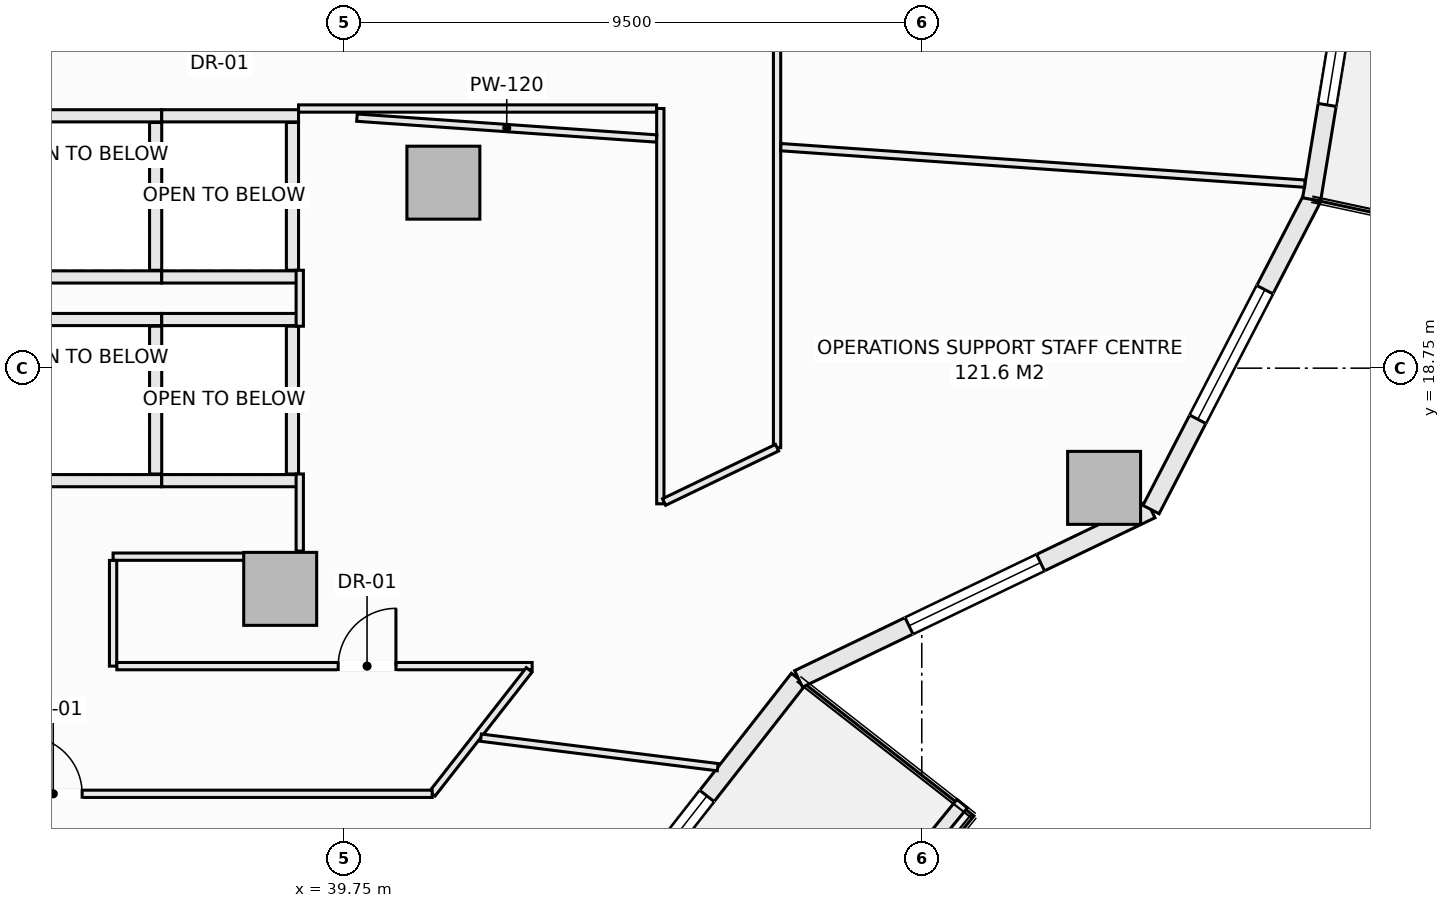
"""IFC4 building model, lengths in metres.
Left out: names, types, materials, properties, quantities, classifications, styles, units other than length and angle.
Written with IfcOpenShell. Run it as: python <this file> out.ifc"""

import sys

from ifc_helpers import new_model, si_unit, direction, frame, frame_2d, origin, origin_2d, place, context, subcontext, project, spatial, rectangle, extrude, element, fill, save


model = new_model("IFC4")
c1 = context("Model", 3, precision=1e-05, world=origin(), true_north=direction((0.0, 1.0)))
c2 = subcontext(c1, "Body", "Model", "MODEL_VIEW")
j1 = project(units=[si_unit("LENGTHUNIT", "METRE"), si_unit("PLANEANGLEUNIT", "RADIAN")], contexts=[c1])
p1 = place(None, origin())
s1 = spatial("IfcSite", under=j1, at=p1, CompositionType="ELEMENT")
p2 = place(p1, origin())
s2 = spatial("IfcBuilding", under=s1, at=p2, CompositionType="ELEMENT")
p3 = place(p2, frame((0.0, 0.0, 80.4)))
s3 = spatial("IfcBuildingStorey", under=s2, at=p3, CompositionType="ELEMENT", Elevation=80.4)
for number, where, z_axis, x_axis in (
    (1, (52.249, 16.781, -0.28), (0.0, 0.0, 1.0), (1.0, 0.0, 0.0)),
    (2, (38.698, 15.121, -0.28), (0.0, 0.0, 1.0), (1.0, 0.0, 0.0)),
    (3, (41.382, 21.801, -0.28), (0.0, 0.0, 1.0), (1.0, 0.0, 0.0)),
):
    element("IfcColumn", number, at=place(p3, frame(where, z_axis=z_axis, x_axis=x_axis)), inside=s3, PredefinedType="COLUMN", context=c2, shape_type="SweptSolid", body=[
        extrude(rectangle(XDim=1.2, YDim=1.2, at=origin_2d()), origin(), (0.0, 0.0, 1.0), 3.85),
    ])
p4 = place(p3, frame((43.344, 8.684, 0.0), z_axis=(0.0, 0.0, 1.0), x_axis=(0.616434798832, 0.78740595552, 0.0)))
e4 = element("IfcWall", 4, at=p4, inside=s3, PredefinedType="SOLIDWALL", context=c2, shape_type="SweptSolid", body=[
    extrude(rectangle(XDim=6.294, YDim=0.3, at=frame_2d((3.147, 0.0))), origin(), (0.0, 0.0, 1.0), 3.093),
])
p5 = place(p4, frame((1.45, 0.0, 0.85)))
e5 = element("IfcOpeningElement", 5, at=p5, cuts=e4, PredefinedType="OPENING", context=c2, shape_type="SweptSolid", body=[
    extrude(rectangle(XDim=2.4, YDim=1.9, at=frame_2d((1.2, 0.95))), frame((0.0, 0.16, 0.0), z_axis=(0.0, -1.0, 0.0), x_axis=(1.0, 0.0, 0.0)), (0.0, 0.0, 1.0), 0.32),
])
p6 = place(p3, frame((47.224, 13.64, 0.0), z_axis=(0.0, 0.0, 1.0), x_axis=(0.901354747727, 0.433081538224, 0.0)))
e6 = element("IfcWall", 6, at=p6, inside=s3, PredefinedType="SOLIDWALL", context=c2, shape_type="SweptSolid", body=[
    extrude(rectangle(XDim=6.431, YDim=0.3, at=frame_2d((3.215, 0.0))), origin(), (0.0, 0.0, 1.0), 3.093),
])
p7 = place(p6, frame((2.015, 0.0, 0.85)))
e7 = element("IfcOpeningElement", 7, at=p7, cuts=e6, PredefinedType="OPENING", context=c2, shape_type="SweptSolid", body=[
    extrude(rectangle(XDim=2.4, YDim=1.9, at=frame_2d((1.2, 0.95))), frame((0.0, 0.16, 0.0), z_axis=(0.0, -1.0, 0.0), x_axis=(1.0, 0.0, 0.0)), (0.0, 0.0, 1.0), 0.32),
])
p8 = place(p3, frame((53.021, 16.425, 0.0), z_axis=(0.0, 0.0, 1.0), x_axis=(0.459800981414, 0.888021991558, 0.0)))
e8 = element("IfcWall", 8, at=p8, inside=s3, PredefinedType="SOLIDWALL", context=c2, shape_type="SweptSolid", body=[
    extrude(rectangle(XDim=5.744, YDim=0.3, at=frame_2d((2.872, 0.0))), origin(), (0.0, 0.0, 1.0), 3.093),
])
p9 = place(p8, frame((1.672, 0.0, 0.85)))
e9 = element("IfcOpeningElement", 9, at=p9, cuts=e8, PredefinedType="OPENING", context=c2, shape_type="SweptSolid", body=[
    extrude(rectangle(XDim=2.4, YDim=1.9, at=frame_2d((1.2, 0.95))), frame((0.0, 0.16, 0.0), z_axis=(0.0, -1.0, 0.0), x_axis=(1.0, 0.0, 0.0)), (0.0, 0.0, 1.0), 0.32),
])
p10 = place(p3, frame((55.662, 21.526, 0.0), z_axis=(0.0, 0.0, 1.0), x_axis=(0.162386212206, 0.986727276447, 0.0)))
e10 = element("IfcWall", 10, at=p10, inside=s3, PredefinedType="SOLIDWALL", context=c2, shape_type="SweptSolid", body=[
    extrude(rectangle(XDim=5.548, YDim=0.3, at=frame_2d((2.774, 0.0))), origin(), (0.0, 0.0, 1.0), 3.093),
])
p11 = place(p10, frame((1.574, 0.0, 0.85)))
e11 = element("IfcOpeningElement", 11, at=p11, cuts=e10, PredefinedType="OPENING", context=c2, shape_type="SweptSolid", body=[
    extrude(rectangle(XDim=2.4, YDim=1.9, at=frame_2d((1.2, 0.95))), frame((0.0, 0.16, 0.0), z_axis=(0.0, -1.0, 0.0), x_axis=(1.0, 0.0, 0.0)), (0.0, 0.0, 1.0), 0.32),
])
p12 = place(p3, frame((45.292, 5.918, 0.0), z_axis=(0.0, 0.0, 1.0), x_axis=(0.631819273026, 0.775115737315, 0.0)))
e12 = element("IfcWall", 12, at=p12, inside=s3, PredefinedType="PARAPET", context=c2, shape_type="SweptSolid", body=[
    extrude(rectangle(XDim=7.316, YDim=0.22, at=frame_2d((3.658, 0.0))), origin(), (0.0, 0.0, 1.0), 0.52),
])
for number, where, z_axis, x_axis in (
    (13, (34.5, 19.55, 0.0), (0.0, 0.0, 1.0), (1.0, 0.0, 0.0)),
    (14, (34.5, 16.9, 0.0), (0.0, 0.0, 1.0), (1.0, 0.0, 0.0)),
):
    element("IfcWall", number, at=place(p3, frame(where, z_axis=z_axis, x_axis=x_axis)), inside=s3, PredefinedType="SOLIDWALL", context=c2, shape_type="SweptSolid", body=[
        extrude(rectangle(XDim=2.25, YDim=0.2, at=frame_2d((1.125, 0.0))), origin(), (0.0, 0.0, 1.0), 3.57),
    ])
p13 = place(p3, frame((36.65, 17.01, 0.0), z_axis=(0.0, 0.0, 1.0), x_axis=(0.0, 1.0, 0.0)))
e15 = element("IfcWall", 15, at=p13, inside=s3, PredefinedType="SOLIDWALL", context=c2, shape_type="SweptSolid", body=[
    extrude(rectangle(XDim=2.43, YDim=0.2, at=frame_2d((1.215, 0.0))), origin(), (0.0, 0.0, 1.0), 3.57),
])
for number, where, z_axis, x_axis in (
    (16, (36.75, 19.55, 0.0), (0.0, 0.0, 1.0), (1.0, 0.0, 0.0)),
    (17, (36.75, 16.9, 0.0), (0.0, 0.0, 1.0), (1.0, 0.0, 0.0)),
):
    element("IfcWall", number, at=place(p3, frame(where, z_axis=z_axis, x_axis=x_axis)), inside=s3, PredefinedType="SOLIDWALL", context=c2, shape_type="SweptSolid", body=[
        extrude(rectangle(XDim=2.25, YDim=0.2, at=frame_2d((1.125, 0.0))), origin(), (0.0, 0.0, 1.0), 3.57),
    ])
p14 = place(p3, frame((38.9, 17.01, 0.0), z_axis=(0.0, 0.0, 1.0), x_axis=(0.0, 1.0, 0.0)))
e18 = element("IfcWall", 18, at=p14, inside=s3, PredefinedType="SOLIDWALL", context=c2, shape_type="SweptSolid", body=[
    extrude(rectangle(XDim=2.43, YDim=0.2, at=frame_2d((1.215, 0.0))), origin(), (0.0, 0.0, 1.0), 3.57),
])
for number, where, z_axis, x_axis in (
    (19, (34.5, 22.9, 0.0), (0.0, 0.0, 1.0), (1.0, 0.0, 0.0)),
    (20, (34.5, 20.25, 0.0), (0.0, 0.0, 1.0), (1.0, 0.0, 0.0)),
):
    element("IfcWall", number, at=place(p3, frame(where, z_axis=z_axis, x_axis=x_axis)), inside=s3, PredefinedType="SOLIDWALL", context=c2, shape_type="SweptSolid", body=[
        extrude(rectangle(XDim=2.25, YDim=0.2, at=frame_2d((1.125, 0.0))), origin(), (0.0, 0.0, 1.0), 3.57),
    ])
p15 = place(p3, frame((36.65, 20.36, 0.0), z_axis=(0.0, 0.0, 1.0), x_axis=(0.0, 1.0, 0.0)))
e21 = element("IfcWall", 21, at=p15, inside=s3, PredefinedType="SOLIDWALL", context=c2, shape_type="SweptSolid", body=[
    extrude(rectangle(XDim=2.43, YDim=0.2, at=frame_2d((1.215, 0.0))), origin(), (0.0, 0.0, 1.0), 3.57),
])
for number, where, z_axis, x_axis in (
    (22, (36.75, 22.9, 0.0), (0.0, 0.0, 1.0), (1.0, 0.0, 0.0)),
    (23, (36.75, 20.25, 0.0), (0.0, 0.0, 1.0), (1.0, 0.0, 0.0)),
):
    element("IfcWall", number, at=place(p3, frame(where, z_axis=z_axis, x_axis=x_axis)), inside=s3, PredefinedType="SOLIDWALL", context=c2, shape_type="SweptSolid", body=[
        extrude(rectangle(XDim=2.25, YDim=0.2, at=frame_2d((1.125, 0.0))), origin(), (0.0, 0.0, 1.0), 3.57),
    ])
p16 = place(p3, frame((38.9, 20.36, 0.0), z_axis=(0.0, 0.0, 1.0), x_axis=(0.0, 1.0, 0.0)))
e24 = element("IfcWall", 24, at=p16, inside=s3, PredefinedType="SOLIDWALL", context=c2, shape_type="SweptSolid", body=[
    extrude(rectangle(XDim=2.43, YDim=0.2, at=frame_2d((1.215, 0.0))), origin(), (0.0, 0.0, 1.0), 3.57),
])
p17 = place(p3, frame((35.95, 15.65, 0.0), z_axis=(0.0, 0.0, 1.0), x_axis=(1.0, 0.0, 0.0)))
e25 = element("IfcWall", 25, at=p17, inside=s3, PredefinedType="PARTITIONING", context=c2, shape_type="SweptSolid", body=[
    extrude(rectangle(XDim=2.291, YDim=0.12, at=frame_2d((1.146, 0.0))), origin(), (0.0, 0.0, 1.0), 3.57),
])
p18 = place(p3, frame((35.95, 13.85, 0.0), z_axis=(0.0, 0.0, 1.0), x_axis=(0.0, 1.0, 0.0)))
e26 = element("IfcWall", 26, at=p18, inside=s3, PredefinedType="PARTITIONING", context=c2, shape_type="SweptSolid", body=[
    extrude(rectangle(XDim=1.738, YDim=0.12, at=frame_2d((0.869, 0.0))), origin(), (0.0, 0.0, 1.0), 3.57),
])
p19 = place(p3, frame((36.012, 13.85, 0.0), z_axis=(0.0, 0.0, 1.0), x_axis=(1.0, 0.0, 0.0)))
e27 = element("IfcWall", 27, at=p19, inside=s3, PredefinedType="PARTITIONING", context=c2, shape_type="SweptSolid", body=[
    extrude(rectangle(XDim=6.83, YDim=0.12, at=frame_2d((3.415, 0.0))), origin(), (0.0, 0.0, 1.0), 3.57),
])
p20 = place(p19, frame((3.64, 0.0, 0.0)))
e28 = element("IfcOpeningElement", 28, at=p20, cuts=e27, PredefinedType="OPENING", context=c2, shape_type="SweptSolid", body=[
    extrude(rectangle(XDim=0.95, YDim=2.1, at=frame_2d((0.475, 1.05))), frame((0.0, 0.07, 0.0), z_axis=(0.0, -1.0, 0.0), x_axis=(1.0, 0.0, 0.0)), (0.0, 0.0, 1.0), 0.14),
])
p21 = place(p3, frame((41.198, 11.75, 0.0), z_axis=(0.0, 0.0, 1.0), x_axis=(0.616412533256, 0.787423386016, 0.0)))
e29 = element("IfcWall", 29, at=p21, inside=s3, PredefinedType="PARTITIONING", context=c2, shape_type="SweptSolid", body=[
    extrude(rectangle(XDim=2.588, YDim=0.12, at=frame_2d((1.294, 0.0))), origin(), (0.0, 0.0, 1.0), 3.57),
])
p22 = place(p3, frame((23.4, 11.75, 0.0), z_axis=(0.0, 0.0, 1.0), x_axis=(1.0, 0.0, 0.0)))
e30 = element("IfcWall", 30, at=p22, inside=s3, PredefinedType="PARTITIONING", context=c2, shape_type="SweptSolid", body=[
    extrude(rectangle(XDim=17.798, YDim=0.12, at=frame_2d((8.899, 0.0))), origin(), (0.0, 0.0, 1.0), 3.57),
])
p23 = place(p22, frame((3.094, 0.0, 0.0)))
e31 = element("IfcOpeningElement", 31, at=p23, cuts=e30, PredefinedType="OPENING", context=c2, shape_type="SweptSolid", body=[
    extrude(rectangle(XDim=0.95, YDim=2.1, at=frame_2d((0.475, 1.05))), frame((0.0, 0.07, 0.0), z_axis=(0.0, -1.0, 0.0), x_axis=(1.0, 0.0, 0.0)), (0.0, 0.0, 1.0), 0.14),
])
p24 = place(p22, frame((11.091, 0.0, 0.0)))
e32 = element("IfcOpeningElement", 32, at=p24, cuts=e30, PredefinedType="OPENING", context=c2, shape_type="SweptSolid", body=[
    extrude(rectangle(XDim=0.95, YDim=2.1, at=frame_2d((0.475, 1.05))), frame((0.0, 0.07, 0.0), z_axis=(0.0, -1.0, 0.0), x_axis=(1.0, 0.0, 0.0)), (0.0, 0.0, 1.0), 0.14),
])
p25 = place(p3, frame((44.95, 16.519, 0.0), z_axis=(0.0, 0.0, 1.0), x_axis=(0.0, 1.0, 0.0)))
e33 = element("IfcWall", 33, at=p25, inside=s3, PredefinedType="PARTITIONING", context=c2, shape_type="SweptSolid", body=[
    extrude(rectangle(XDim=6.501, YDim=0.12, at=frame_2d((3.25, 0.0))), origin(), (0.0, 0.0, 1.0), 3.57),
])
p26 = place(p3, frame((46.87, 17.442, 0.0), z_axis=(0.0, 0.0, 1.0), x_axis=(0.0, 1.0, 0.0)))
e34 = element("IfcWall", 34, at=p26, inside=s3, PredefinedType="PARTITIONING", context=c2, shape_type="SweptSolid", body=[
    extrude(rectangle(XDim=19.116, YDim=0.12, at=frame_2d((9.558, 0.0))), origin(), (0.0, 0.0, 1.0), 3.57),
])
p27 = place(p26, frame((11.352, 0.0, 0.0)))
e35 = element("IfcOpeningElement", 35, at=p27, cuts=e34, PredefinedType="OPENING", context=c2, shape_type="SweptSolid", body=[
    extrude(rectangle(XDim=0.95, YDim=2.1, at=frame_2d((0.475, 1.05))), frame((0.0, 0.07, 0.0), z_axis=(0.0, -1.0, 0.0), x_axis=(1.0, 0.0, 0.0)), (0.0, 0.0, 1.0), 0.14),
])
p28 = place(p3, frame((45.012, 16.549, 0.0), z_axis=(0.0, 0.0, 1.0), x_axis=(0.901304887575, 0.433185294803, 0.0)))
e36 = element("IfcWall", 36, at=p28, inside=s3, PredefinedType="PARTITIONING", context=c2, shape_type="SweptSolid", body=[
    extrude(rectangle(XDim=2.062, YDim=0.12, at=frame_2d((1.031, 0.0))), origin(), (0.0, 0.0, 1.0), 3.57),
])
p29 = place(p3, frame((39.0, 23.02, 0.0), z_axis=(0.0, 0.0, 1.0), x_axis=(1.0, 0.0, 0.0)))
e37 = element("IfcWall", 37, at=p29, inside=s3, PredefinedType="PARTITIONING", context=c2, shape_type="SweptSolid", body=[
    extrude(rectangle(XDim=5.888, YDim=0.12, at=frame_2d((2.944, 0.0))), origin(), (0.0, 0.0, 1.0), 3.57),
])
p30 = place(p3, frame((39.02, 15.742, 0.0), z_axis=(0.0, 0.0, 1.0), x_axis=(0.0, 1.0, 0.0)))
e38 = element("IfcWall", 38, at=p30, inside=s3, PredefinedType="PARTITIONING", context=c2, shape_type="SweptSolid", body=[
    extrude(rectangle(XDim=1.268, YDim=0.12, at=frame_2d((0.634, 0.0))), origin(), (0.0, 0.0, 1.0), 2.934),
])
p31 = place(p3, frame((39.02, 19.44, 0.0), z_axis=(0.0, 0.0, 1.0), x_axis=(0.0, 1.0, 0.0)))
e39 = element("IfcWall", 39, at=p31, inside=s3, PredefinedType="PARTITIONING", context=c2, shape_type="SweptSolid", body=[
    extrude(rectangle(XDim=0.92, YDim=0.12, at=frame_2d((0.46, 0.0))), origin(), (0.0, 0.0, 1.0), 3.57),
])
p32 = place(p3, frame((39.961, 22.87, 0.0), z_axis=(0.0, 0.0, 1.0), x_axis=(0.99758211908, -0.069497594858, 0.0)))
e40 = element("IfcWall", 40, at=p32, inside=s3, PredefinedType="PARTITIONING", context=c2, shape_type="SweptSolid", body=[
    extrude(rectangle(XDim=4.939, YDim=0.12, at=frame_2d((2.47, 0.0))), origin(), (0.0, 0.0, 1.0), 3.57),
])
p33 = place(p3, frame((46.932, 22.385, 0.0), z_axis=(0.0, 0.0, 1.0), x_axis=(0.997586585682, -0.069433450639, 0.0)))
e41 = element("IfcWall", 41, at=p33, inside=s3, PredefinedType="PARTITIONING", context=c2, shape_type="SweptSolid", body=[
    extrude(rectangle(XDim=8.639, YDim=0.12, at=frame_2d((4.32, 0.0))), origin(), (0.0, 0.0, 1.0), 3.205),
])
p34 = place(p3, frame((42.0, 12.674, 0.0), z_axis=(0.0, 0.0, 1.0), x_axis=(0.992316110302, -0.123728481908, 0.0)))
e42 = element("IfcWall", 42, at=p34, inside=s3, PredefinedType="PARTITIONING", context=c2, shape_type="SweptSolid", body=[
    extrude(rectangle(XDim=3.925, YDim=0.12, at=frame_2d((1.962, 0.0))), origin(), (0.0, 0.0, 1.0), 3.57),
])
p35 = place(p3, frame((29.818, 11.688, 0.0), z_axis=(0.0, 0.0, 1.0), x_axis=(0.944668147769, -0.328027575961, 0.0)))
e43 = element("IfcWall", 43, at=p35, inside=s3, PredefinedType="PARTITIONING", context=c2, shape_type="SweptSolid", body=[
    extrude(rectangle(XDim=11.428, YDim=0.12, at=frame_2d((5.714, 0.0))), origin(), (0.0, 0.0, 1.0), 3.093),
])
p36 = place(p5, origin())
e44 = element("IfcWindow", 44, at=p36, inside=s3, PartitioningType="SINGLE_PANEL", PredefinedType="WINDOW", context=c2, shape_type="SweptSolid", body=[
    extrude(rectangle(XDim=2.4, YDim=1.9, at=frame_2d((1.2, 0.95))), frame((0.0, 0.03, 0.0), z_axis=(0.0, -1.0, 0.0), x_axis=(1.0, 0.0, 0.0)), (0.0, 0.0, 1.0), 0.06),
])
fill(e5, e44)
p37 = place(p7, origin())
e45 = element("IfcWindow", 45, at=p37, inside=s3, PartitioningType="SINGLE_PANEL", PredefinedType="WINDOW", context=c2, shape_type="SweptSolid", body=[
    extrude(rectangle(XDim=2.4, YDim=1.9, at=frame_2d((1.2, 0.95))), frame((0.0, 0.03, 0.0), z_axis=(0.0, -1.0, 0.0), x_axis=(1.0, 0.0, 0.0)), (0.0, 0.0, 1.0), 0.06),
])
fill(e7, e45)
p38 = place(p9, origin())
e46 = element("IfcWindow", 46, at=p38, inside=s3, PartitioningType="SINGLE_PANEL", PredefinedType="WINDOW", context=c2, shape_type="SweptSolid", body=[
    extrude(rectangle(XDim=2.4, YDim=1.9, at=frame_2d((1.2, 0.95))), frame((0.0, 0.03, 0.0), z_axis=(0.0, -1.0, 0.0), x_axis=(1.0, 0.0, 0.0)), (0.0, 0.0, 1.0), 0.06),
])
fill(e9, e46)
p39 = place(p11, origin())
e47 = element("IfcWindow", 47, at=p39, inside=s3, PartitioningType="SINGLE_PANEL", PredefinedType="WINDOW", context=c2, shape_type="SweptSolid", body=[
    extrude(rectangle(XDim=2.4, YDim=1.9, at=frame_2d((1.2, 0.95))), frame((0.0, 0.03, 0.0), z_axis=(0.0, -1.0, 0.0), x_axis=(1.0, 0.0, 0.0)), (0.0, 0.0, 1.0), 0.06),
])
fill(e11, e47)
p40 = place(p24, origin())
e48 = element("IfcDoor", 48, at=p40, inside=s3, OperationType="SINGLE_SWING_LEFT", PredefinedType="DOOR", context=c2, shape_type="SweptSolid", body=[
    extrude(rectangle(XDim=0.95, YDim=2.1, at=frame_2d((0.475, 1.05))), frame((0.0, 0.025, 0.0), z_axis=(0.0, -1.0, 0.0), x_axis=(1.0, 0.0, 0.0)), (0.0, 0.0, 1.0), 0.05),
])
fill(e32, e48)
p41 = place(p20, origin())
e49 = element("IfcDoor", 49, at=p41, inside=s3, OperationType="SINGLE_SWING_RIGHT", PredefinedType="DOOR", context=c2, shape_type="SweptSolid", body=[
    extrude(rectangle(XDim=0.95, YDim=2.1, at=frame_2d((0.475, 1.05))), frame((0.0, 0.025, 0.0), z_axis=(0.0, -1.0, 0.0), x_axis=(1.0, 0.0, 0.0)), (0.0, 0.0, 1.0), 0.05),
])
fill(e28, e49)
save(model, sys.argv[1])
